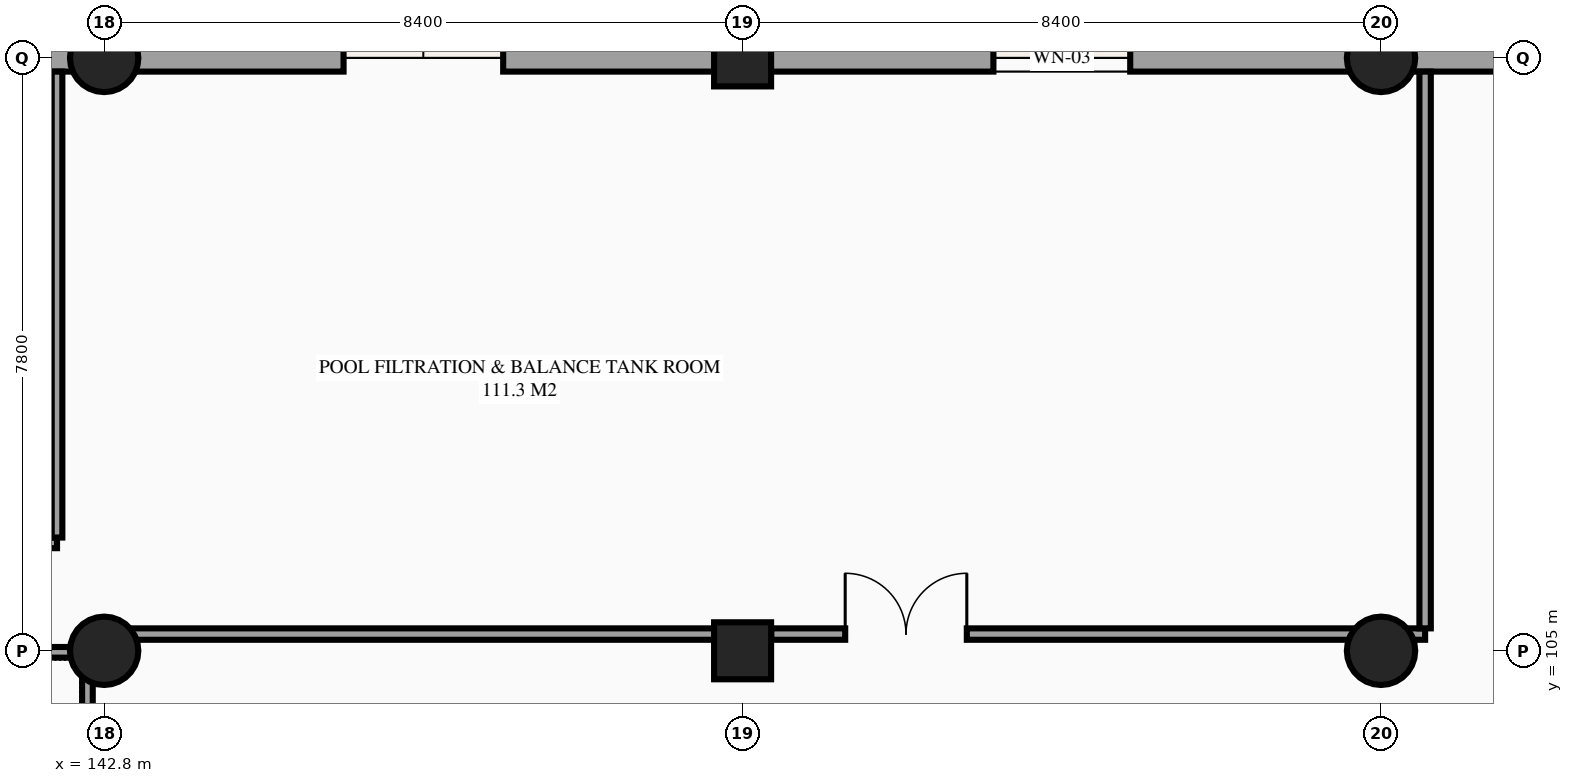
"""IFC4 building model, lengths in metres.
Left out: names, types, materials, properties, quantities, classifications, styles, units other than length and angle.
Written with IfcOpenShell. Run it as: python <this file> out.ifc"""

import sys

from ifc_helpers import new_model, si_unit, direction, frame, frame_2d, origin, origin_2d, place, context, subcontext, project, spatial, rectangle, circle, extrude, element, fill, save


model = new_model("IFC4")
c1 = context("Model", 3, precision=1e-05, world=origin(), true_north=direction((0.0, 1.0)))
c2 = subcontext(c1, "Body", "Model", "MODEL_VIEW")
j1 = project(units=[si_unit("LENGTHUNIT", "METRE"), si_unit("PLANEANGLEUNIT", "RADIAN")], contexts=[c1])
p1 = place(None, origin())
s1 = spatial("IfcSite", under=j1, at=p1, CompositionType="ELEMENT")
p2 = place(p1, origin())
s2 = spatial("IfcBuilding", under=s1, at=p2, CompositionType="ELEMENT")
p3 = place(p2, origin())
s3 = spatial("IfcBuildingStorey", under=s2, at=p3, CompositionType="ELEMENT", Elevation=0.0)
for number, where, z_axis, x_axis in (
    (1, (142.8, 105.0, 0.0), (0.0, 0.0, 1.0), (1.0, 0.0, 0.0)),
    (2, (142.8, 112.8, 0.0), (0.0, 0.0, 1.0), (1.0, 0.0, 0.0)),
):
    element("IfcColumn", number, at=place(p3, frame(where, z_axis=z_axis, x_axis=x_axis)), inside=s3, PredefinedType="COLUMN", context=c2, shape_type="SweptSolid", body=[
        extrude(circle(Radius=0.45, at=origin_2d()), origin(), (0.0, 0.0, 1.0), 5.4),
    ])
for number, where, z_axis, x_axis in (
    (3, (151.2, 105.0, 0.0), (0.0, 0.0, 1.0), (1.0, 0.0, 0.0)),
    (4, (151.2, 112.8, 0.0), (0.0, 0.0, 1.0), (1.0, 0.0, 0.0)),
):
    element("IfcColumn", number, at=place(p3, frame(where, z_axis=z_axis, x_axis=x_axis)), inside=s3, PredefinedType="COLUMN", context=c2, shape_type="SweptSolid", body=[
        extrude(rectangle(XDim=0.75, YDim=0.75, at=origin_2d()), origin(), (0.0, 0.0, 1.0), 5.4),
    ])
for number, where, z_axis, x_axis in (
    (5, (159.6, 105.0, 0.0), (0.0, 0.0, 1.0), (1.0, 0.0, 0.0)),
    (6, (159.6, 112.8, 0.0), (0.0, 0.0, 1.0), (1.0, 0.0, 0.0)),
):
    element("IfcColumn", number, at=place(p3, frame(where, z_axis=z_axis, x_axis=x_axis)), inside=s3, PredefinedType="COLUMN", context=c2, shape_type="SweptSolid", body=[
        extrude(circle(Radius=0.45, at=origin_2d()), origin(), (0.0, 0.0, 1.0), 5.4),
    ])
p4 = place(p3, frame((168.0, 112.8, 0.0), z_axis=(0.0, 0.0, 1.0), x_axis=(-1.0, 0.0, 0.0)))
e7 = element("IfcWall", 7, at=p4, inside=s3, PredefinedType="STANDARD", context=c2, shape_type="SweptSolid", body=[
    extrude(rectangle(XDim=8.4, YDim=0.36, at=frame_2d((4.2, 0.0))), origin(), (0.0, 0.0, 1.0), 4.607),
])
p5 = place(p4, frame((5.25, 0.0, 0.0), z_axis=(0.0, 0.0, 1.0), x_axis=(-1.0, 0.0, 0.0)))
e8 = element("IfcOpeningElement", 8, at=p5, cuts=e7, PredefinedType="OPENING", context=c2, shape_type="SweptSolid", body=[
    extrude(rectangle(XDim=2.1, YDim=2.4, at=frame_2d((1.05, 1.2))), frame((0.0, 0.19, 0.0), z_axis=(0.0, -1.0, 0.0), x_axis=(1.0, 0.0, 0.0)), (0.0, 0.0, 1.0), 0.38),
])
p6 = place(p3, frame((159.6, 112.8, 0.0), z_axis=(0.0, 0.0, 1.0), x_axis=(-1.0, 0.0, 0.0)))
e9 = element("IfcWall", 9, at=p6, inside=s3, PredefinedType="STANDARD", context=c2, shape_type="SweptSolid", body=[
    extrude(rectangle(XDim=8.4, YDim=0.36, at=frame_2d((4.2, 0.0))), origin(), (0.0, 0.0, 1.0), 4.64),
])
p7 = place(p6, frame((3.3, 0.0, 0.8)))
e10 = element("IfcOpeningElement", 10, at=p7, cuts=e9, PredefinedType="OPENING", context=c2, shape_type="SweptSolid", body=[
    extrude(rectangle(XDim=1.8, YDim=1.5, at=frame_2d((0.9, 0.75))), frame((0.0, 0.19, 0.0), z_axis=(0.0, -1.0, 0.0), x_axis=(1.0, 0.0, 0.0)), (0.0, 0.0, 1.0), 0.38),
])
p8 = place(p3, frame((151.2, 112.8, 0.0), z_axis=(0.0, 0.0, 1.0), x_axis=(-1.0, 0.0, 0.0)))
e11 = element("IfcWall", 11, at=p8, inside=s3, PredefinedType="STANDARD", context=c2, shape_type="SweptSolid", body=[
    extrude(rectangle(XDim=8.4, YDim=0.36, at=frame_2d((4.2, 0.0))), origin(), (0.0, 0.0, 1.0), 4.29),
])
p9 = place(p8, frame((5.25, 0.0, 0.0), z_axis=(0.0, 0.0, 1.0), x_axis=(-1.0, 0.0, 0.0)))
e12 = element("IfcOpeningElement", 12, at=p9, cuts=e11, PredefinedType="OPENING", context=c2, shape_type="SweptSolid", body=[
    extrude(rectangle(XDim=2.1, YDim=2.4, at=frame_2d((1.05, 1.2))), frame((0.0, 0.19, 0.0), z_axis=(0.0, -1.0, 0.0), x_axis=(1.0, 0.0, 0.0)), (0.0, 0.0, 1.0), 0.38),
])
p10 = place(p3, frame((142.8, 112.8, 0.0), z_axis=(0.0, 0.0, 1.0), x_axis=(-1.0, 0.0, 0.0)))
e13 = element("IfcWall", 13, at=p10, inside=s3, PredefinedType="STANDARD", context=c2, shape_type="SweptSolid", body=[
    extrude(rectangle(XDim=8.4, YDim=0.36, at=frame_2d((4.2, 0.0))), origin(), (0.0, 0.0, 1.0), 4.786),
])
p11 = place(p10, frame((5.25, 0.0, 0.0), z_axis=(0.0, 0.0, 1.0), x_axis=(-1.0, 0.0, 0.0)))
e14 = element("IfcOpeningElement", 14, at=p11, cuts=e13, PredefinedType="OPENING", context=c2, shape_type="SweptSolid", body=[
    extrude(rectangle(XDim=2.1, YDim=2.4, at=frame_2d((1.05, 1.2))), frame((0.0, 0.19, 0.0), z_axis=(0.0, -1.0, 0.0), x_axis=(1.0, 0.0, 0.0)), (0.0, 0.0, 1.0), 0.38),
])
p12 = place(p3, frame((138.02, 104.98, 0.0), z_axis=(0.0, 0.0, 1.0), x_axis=(1.0, 0.0, 0.0)))
e15 = element("IfcWall", 15, at=p12, inside=s3, PredefinedType="PARTITIONING", context=c2, shape_type="SweptSolid", body=[
    extrude(rectangle(XDim=4.56, YDim=0.14, at=frame_2d((2.28, 0.0))), origin(), (0.0, 0.0, 1.0), 4.64),
])
p13 = place(p12, frame((1.83, 0.0, 0.0)))
e16 = element("IfcOpeningElement", 16, at=p13, cuts=e15, PredefinedType="OPENING", context=c2, shape_type="SweptSolid", body=[
    extrude(rectangle(XDim=0.9, YDim=2.12, at=frame_2d((0.45, 1.06))), frame((0.0, 0.08, 0.0), z_axis=(0.0, -1.0, 0.0), x_axis=(1.0, 0.0, 0.0)), (0.0, 0.0, 1.0), 0.16),
])
p14 = place(p3, frame((142.58, 96.62, 0.0), z_axis=(0.0, 0.0, 1.0), x_axis=(0.0, 1.0, 0.0)))
e17 = element("IfcWall", 17, at=p14, inside=s3, PredefinedType="PARTITIONING", context=c2, shape_type="SweptSolid", body=[
    extrude(rectangle(XDim=8.29, YDim=0.14, at=frame_2d((4.145, 0.0))), origin(), (0.0, 0.0, 1.0), 5.135),
])
p15 = place(p3, frame((133.42, 106.42, 0.0), z_axis=(0.0, 0.0, 1.0), x_axis=(1.0, 0.0, 0.0)))
e18 = element("IfcWall", 18, at=p15, inside=s3, PredefinedType="PARTITIONING", context=c2, shape_type="SweptSolid", body=[
    extrude(rectangle(XDim=8.76, YDim=0.14, at=frame_2d((4.38, 0.0))), origin(), (0.0, 0.0, 1.0), 5.135),
])
p16 = place(p15, frame((3.93, 0.0, 0.0)))
e19 = element("IfcOpeningElement", 19, at=p16, cuts=e18, PredefinedType="OPENING", context=c2, shape_type="SweptSolid", body=[
    extrude(rectangle(XDim=0.9, YDim=2.12, at=frame_2d((0.45, 1.06))), frame((0.0, 0.08, 0.0), z_axis=(0.0, -1.0, 0.0), x_axis=(1.0, 0.0, 0.0)), (0.0, 0.0, 1.0), 0.16),
])
p17 = place(p3, frame((142.18, 106.49, 0.0), z_axis=(0.0, 0.0, 1.0), x_axis=(0.0, 1.0, 0.0)))
e20 = element("IfcWall", 20, at=p17, inside=s3, PredefinedType="PARTITIONING", context=c2, shape_type="SweptSolid", body=[
    extrude(rectangle(XDim=6.13, YDim=0.14, at=frame_2d((3.065, 0.0))), origin(), (0.0, 0.0, 1.0), 5.135),
])
p18 = place(p3, frame((151.575, 105.22, 0.0), z_axis=(0.0, 0.0, 1.0), x_axis=(1.0, 0.0, 0.0)))
e21 = element("IfcWall", 21, at=p18, inside=s3, PredefinedType="PARTITIONING", context=c2, shape_type="SweptSolid", body=[
    extrude(rectangle(XDim=8.605, YDim=0.15, at=frame_2d((4.302, 0.0))), origin(), (0.0, 0.0, 1.0), 4.24),
])
p19 = place(p18, frame((0.975, 0.0, 0.0)))
e22 = element("IfcOpeningElement", 22, at=p19, cuts=e21, PredefinedType="OPENING", context=c2, shape_type="SweptSolid", body=[
    extrude(rectangle(XDim=1.6, YDim=2.25, at=frame_2d((0.8, 1.125))), frame((0.0, 0.085, 0.0), z_axis=(0.0, -1.0, 0.0), x_axis=(1.0, 0.0, 0.0)), (0.0, 0.0, 1.0), 0.17),
])
p20 = place(p3, frame((160.18, 105.295, 0.0), z_axis=(0.0, 0.0, 1.0), x_axis=(0.0, 1.0, 0.0)))
e23 = element("IfcWall", 23, at=p20, inside=s3, PredefinedType="PARTITIONING", context=c2, shape_type="SweptSolid", body=[
    extrude(rectangle(XDim=7.325, YDim=0.15, at=frame_2d((3.663, 0.0))), origin(), (0.0, 0.0, 1.0), 5.135),
])
p21 = place(p3, frame((143.02, 105.22, 0.0), z_axis=(0.0, 0.0, 1.0), x_axis=(1.0, 0.0, 0.0)))
e24 = element("IfcWall", 24, at=p21, inside=s3, PredefinedType="PARTITIONING", context=c2, shape_type="SweptSolid", body=[
    extrude(rectangle(XDim=8.555, YDim=0.15, at=frame_2d((4.277, 0.0))), origin(), (0.0, 0.0, 1.0), 5.135),
])
p22 = place(p7, origin())
e25 = element("IfcWindow", 25, at=p22, inside=s3, PartitioningType="SINGLE_PANEL", PredefinedType="WINDOW", context=c2, shape_type="SweptSolid", body=[
    extrude(rectangle(XDim=1.8, YDim=1.5, at=frame_2d((0.9, 0.75))), frame((0.0, 0.03, 0.0), z_axis=(0.0, -1.0, 0.0), x_axis=(1.0, 0.0, 0.0)), (0.0, 0.0, 1.0), 0.06),
])
fill(e10, e25)
p23 = place(p9, origin())
e26 = element("IfcDoor", 26, at=p23, inside=s3, OperationType="DOUBLE_DOOR_SINGLE_SWING", PredefinedType="DOOR", context=c2, shape_type="SweptSolid", body=[
    extrude(rectangle(XDim=2.1, YDim=2.4, at=frame_2d((1.05, 1.2))), frame((0.0, 0.025, 0.0), z_axis=(0.0, -1.0, 0.0), x_axis=(1.0, 0.0, 0.0)), (0.0, 0.0, 1.0), 0.05),
])
fill(e12, e26)
p24 = place(p19, origin())
e27 = element("IfcDoor", 27, at=p24, inside=s3, OperationType="DOUBLE_DOOR_SINGLE_SWING", PredefinedType="DOOR", context=c2, shape_type="SweptSolid", body=[
    extrude(rectangle(XDim=1.6, YDim=2.25, at=frame_2d((0.8, 1.125))), frame((0.0, 0.025, 0.0), z_axis=(0.0, -1.0, 0.0), x_axis=(1.0, 0.0, 0.0)), (0.0, 0.0, 1.0), 0.05),
])
fill(e22, e27)
save(model, sys.argv[1])
